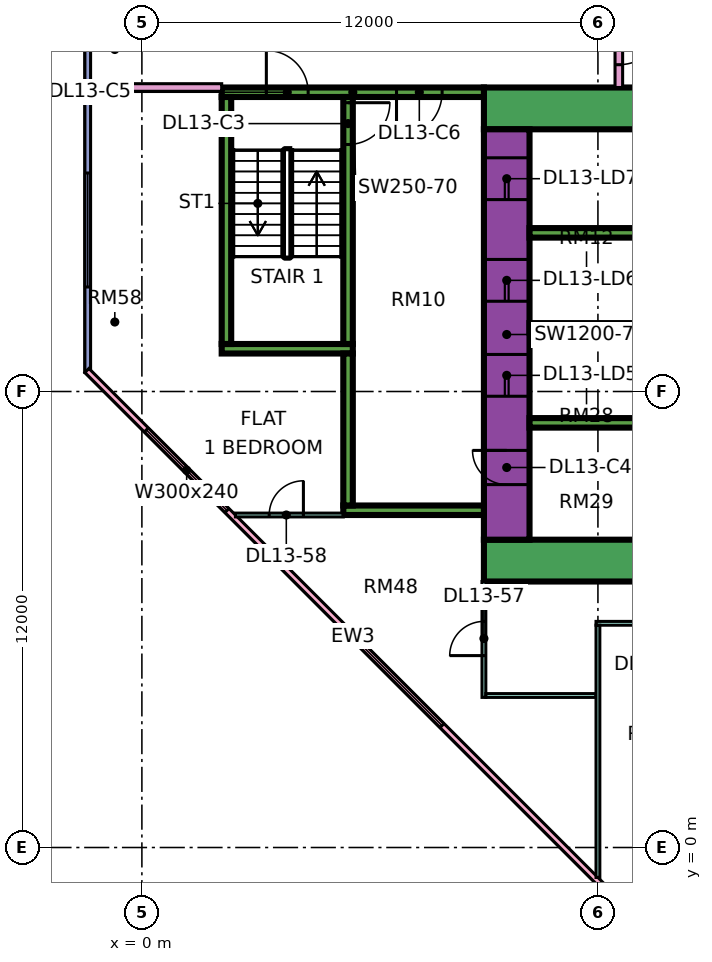
"""IFC4 building model, lengths in metres.
Left out: names, types, materials, properties, quantities, classifications, styles, units other than length and angle.
Written with IfcOpenShell. Run it as: python <this file> out.ifc"""

import sys

from ifc_helpers import new_model, si_unit, direction, frame, frame_2d, origin, place, context, subcontext, project, spatial, rectangle, extrude, element, fill, save


model = new_model("IFC4")
c1 = context("Model", 3, precision=1e-05, world=origin(), true_north=direction((0.0, 1.0)))
c2 = subcontext(c1, "Body", "Model", "MODEL_VIEW")
j1 = project(units=[si_unit("LENGTHUNIT", "METRE"), si_unit("PLANEANGLEUNIT", "RADIAN")], contexts=[c1])
p1 = place(None, origin())
s1 = spatial("IfcSite", under=j1, at=p1, CompositionType="ELEMENT")
p2 = place(p1, origin())
s2 = spatial("IfcBuilding", under=s1, at=p2, CompositionType="ELEMENT")
p3 = place(p2, frame((0.0, 0.0, 63.9)))
s3 = spatial("IfcBuildingStorey", under=s2, at=p3, CompositionType="ELEMENT", Elevation=63.9)
p4 = place(p3, frame((9.0, 7.55, 0.0), z_axis=(0.0, 0.0, 1.0), x_axis=(1.0, 0.0, 0.0)))
e1 = element("IfcWall", 1, at=p4, inside=s3, PredefinedType="SHEAR", context=c2, shape_type="SweptSolid", body=[
    extrude(rectangle(XDim=25.0, YDim=1.1, at=frame_2d((12.5, 0.0))), origin(), (0.0, 0.0, 1.0), 3.75),
])
p5 = place(p3, frame((9.0, 19.45, 0.0), z_axis=(0.0, 0.0, 1.0), x_axis=(1.0, 0.0, 0.0)))
e2 = element("IfcWall", 2, at=p5, inside=s3, PredefinedType="SHEAR", context=c2, shape_type="SweptSolid", body=[
    extrude(rectangle(XDim=25.0, YDim=1.1, at=frame_2d((12.5, 0.0))), origin(), (0.0, 0.0, 1.0), 3.75),
])
p6 = place(p5, frame((19.1, 0.0, 0.0)))
e3 = element("IfcOpeningElement", 3, at=p6, cuts=e2, PredefinedType="OPENING", context=c2, shape_type="SweptSolid", body=[
    extrude(rectangle(XDim=1.8, YDim=2.4, at=frame_2d((0.9, 1.2))), frame((0.0, 0.56, 0.0), z_axis=(0.0, -1.0, 0.0), x_axis=(1.0, 0.0, 0.0)), (0.0, 0.0, 1.0), 1.12),
])
p7 = place(p3, frame((9.6, 8.1, 0.0), z_axis=(0.0, 0.0, 1.0), x_axis=(0.0, 1.0, 0.0)))
e4 = element("IfcWall", 4, at=p7, inside=s3, PredefinedType="SHEAR", context=c2, shape_type="SweptSolid", body=[
    extrude(rectangle(XDim=10.8, YDim=1.2, at=frame_2d((5.4, 0.0))), origin(), (0.0, 0.0, 1.0), 3.75),
])
p8 = place(p7, frame((3.775, 0.0, 0.0)))
e5 = element("IfcOpeningElement", 5, at=p8, cuts=e4, PredefinedType="OPENING", context=c2, shape_type="SweptSolid", body=[
    extrude(rectangle(XDim=1.1, YDim=2.2, at=frame_2d((0.55, 1.1))), frame((0.0, 0.61, 0.0), z_axis=(0.0, -1.0, 0.0), x_axis=(1.0, 0.0, 0.0)), (0.0, 0.0, 1.0), 1.22),
])
p9 = place(p7, frame((6.275, 0.0, 0.0)))
e6 = element("IfcOpeningElement", 6, at=p9, cuts=e4, PredefinedType="OPENING", context=c2, shape_type="SweptSolid", body=[
    extrude(rectangle(XDim=1.1, YDim=2.2, at=frame_2d((0.55, 1.1))), frame((0.0, 0.61, 0.0), z_axis=(0.0, -1.0, 0.0), x_axis=(1.0, 0.0, 0.0)), (0.0, 0.0, 1.0), 1.22),
])
p10 = place(p7, frame((8.95, 0.0, 0.0)))
e7 = element("IfcOpeningElement", 7, at=p10, cuts=e4, PredefinedType="OPENING", context=c2, shape_type="SweptSolid", body=[
    extrude(rectangle(XDim=1.1, YDim=2.2, at=frame_2d((0.55, 1.1))), frame((0.0, 0.61, 0.0), z_axis=(0.0, -1.0, 0.0), x_axis=(1.0, 0.0, 0.0)), (0.0, 0.0, 1.0), 1.22),
])
p11 = place(p7, frame((1.45, 0.0, 0.0)))
e8 = element("IfcOpeningElement", 8, at=p11, cuts=e4, PredefinedType="OPENING", context=c2, shape_type="SweptSolid", body=[
    extrude(rectangle(XDim=0.9, YDim=2.1, at=frame_2d((0.45, 1.05))), frame((0.0, 0.61, 0.0), z_axis=(0.0, -1.0, 0.0), x_axis=(1.0, 0.0, 0.0)), (0.0, 0.0, 1.0), 1.22),
])
for number, where, z_axis, x_axis in (
    (9, (10.2, 11.175, 0.0), (0.0, 0.0, 1.0), (1.0, 0.0, 0.0)),
    (10, (10.2, 13.675, 0.0), (0.0, 0.0, 1.0), (1.0, 0.0, 0.0)),
    (11, (10.2, 16.175, 0.0), (0.0, 0.0, 1.0), (1.0, 0.0, 0.0)),
):
    element("IfcWall", number, at=place(p3, frame(where, z_axis=z_axis, x_axis=x_axis)), inside=s3, PredefinedType="SHEAR", context=c2, shape_type="SweptSolid", body=[
        extrude(rectangle(XDim=3.0, YDim=0.25, at=frame_2d((1.5, 0.0))), origin(), (0.0, 0.0, 1.0), 3.75),
    ])
p12 = place(p3, frame((2.1, 19.875, 0.0), z_axis=(0.0, 0.0, 1.0), x_axis=(1.0, 0.0, 0.0)))
e12 = element("IfcWall", 12, at=p12, inside=s3, PredefinedType="SHEAR", context=c2, shape_type="SweptSolid", body=[
    extrude(rectangle(XDim=6.9, YDim=0.25, at=frame_2d((3.45, 0.0))), origin(), (0.0, 0.0, 1.0), 3.75),
])
p13 = place(p12, frame((1.175, 0.0, 0.0)))
e13 = element("IfcOpeningElement", 13, at=p13, cuts=e12, PredefinedType="OPENING", context=c2, shape_type="SweptSolid", body=[
    extrude(rectangle(XDim=1.1, YDim=2.2, at=frame_2d((0.55, 1.1))), frame((0.0, 0.135, 0.0), z_axis=(0.0, -1.0, 0.0), x_axis=(1.0, 0.0, 0.0)), (0.0, 0.0, 1.0), 0.27),
])
p14 = place(p12, frame((4.6, 0.0, 0.0)))
e14 = element("IfcOpeningElement", 14, at=p14, cuts=e12, PredefinedType="OPENING", context=c2, shape_type="SweptSolid", body=[
    extrude(rectangle(XDim=1.2, YDim=2.2, at=frame_2d((0.6, 1.1))), frame((0.0, 0.135, 0.0), z_axis=(0.0, -1.0, 0.0), x_axis=(1.0, 0.0, 0.0)), (0.0, 0.0, 1.0), 0.27),
])
p15 = place(p3, frame((2.1, 13.125, 0.0), z_axis=(0.0, 0.0, 1.0), x_axis=(1.0, 0.0, 0.0)))
e15 = element("IfcWall", 15, at=p15, inside=s3, PredefinedType="SHEAR", context=c2, shape_type="SweptSolid", body=[
    extrude(rectangle(XDim=3.45, YDim=0.25, at=frame_2d((1.725, 0.0))), origin(), (0.0, 0.0, 1.0), 3.75),
])
p16 = place(p3, frame((2.225, 13.25, 0.0), z_axis=(0.0, 0.0, 1.0), x_axis=(0.0, 1.0, 0.0)))
e16 = element("IfcWall", 16, at=p16, inside=s3, PredefinedType="SHEAR", context=c2, shape_type="SweptSolid", body=[
    extrude(rectangle(XDim=6.5, YDim=0.25, at=frame_2d((3.25, 0.0))), origin(), (0.0, 0.0, 1.0), 3.75),
])
p17 = place(p3, frame((5.425, 13.25, 0.0), z_axis=(0.0, 0.0, 1.0), x_axis=(0.0, 1.0, 0.0)))
e17 = element("IfcWall", 17, at=p17, inside=s3, PredefinedType="SHEAR", context=c2, shape_type="SweptSolid", body=[
    extrude(rectangle(XDim=6.5, YDim=0.25, at=frame_2d((3.25, 0.0))), origin(), (0.0, 0.0, 1.0), 3.75),
])
p18 = place(p17, frame((5.25, 0.0, 0.0)))
e18 = element("IfcOpeningElement", 18, at=p18, cuts=e17, PredefinedType="OPENING", context=c2, shape_type="SweptSolid", body=[
    extrude(rectangle(XDim=1.1, YDim=2.2, at=frame_2d((0.55, 1.1))), frame((0.0, 0.135, 0.0), z_axis=(0.0, -1.0, 0.0), x_axis=(1.0, 0.0, 0.0)), (0.0, 0.0, 1.0), 0.27),
])
p19 = place(p3, frame((5.3, 8.875, 0.0), z_axis=(0.0, 0.0, 1.0), x_axis=(1.0, 0.0, 0.0)))
e19 = element("IfcWall", 19, at=p19, inside=s3, PredefinedType="SHEAR", context=c2, shape_type="SweptSolid", body=[
    extrude(rectangle(XDim=3.7, YDim=0.25, at=frame_2d((1.85, 0.0))), origin(), (0.0, 0.0, 1.0), 3.75),
])
p20 = place(p3, frame((5.425, 9.0, 0.0), z_axis=(0.0, 0.0, 1.0), x_axis=(0.0, 1.0, 0.0)))
e20 = element("IfcWall", 20, at=p20, inside=s3, PredefinedType="SHEAR", context=c2, shape_type="SweptSolid", body=[
    extrude(rectangle(XDim=4.0, YDim=0.25, at=frame_2d((2.0, 0.0))), origin(), (0.0, 0.0, 1.0), 3.75),
])
p21 = place(p3, frame((-1.425, 23.925, 0.0), z_axis=(0.0, 0.0, 1.0), x_axis=(0.0, -1.0, 0.0)))
e21 = element("IfcWall", 21, at=p21, inside=s3, PredefinedType="SOLIDWALL", context=c2, shape_type="SweptSolid", body=[
    extrude(rectangle(XDim=11.425, YDim=0.15, at=frame_2d((5.712, 0.0))), origin(), (0.0, 0.0, 1.0), 3.35),
])
p22 = place(p21, frame((6.175, 0.0, 0.45)))
e22 = element("IfcOpeningElement", 22, at=p22, cuts=e21, PredefinedType="OPENING", context=c2, shape_type="SweptSolid", body=[
    extrude(rectangle(XDim=3.0, YDim=2.4, at=frame_2d((1.5, 1.2))), frame((0.0, 0.085, 0.0), z_axis=(0.0, -1.0, 0.0), x_axis=(1.0, 0.0, 0.0)), (0.0, 0.0, 1.0), 0.17),
])
p23 = place(p3, frame((-1.447, 12.553, 0.0), z_axis=(0.0, 0.0, 1.0), x_axis=(0.707106781187, -0.707106781187, 0.0)))
e23 = element("IfcWall", 23, at=p23, inside=s3, PredefinedType="SOLIDWALL", context=c2, shape_type="SweptSolid", body=[
    extrude(rectangle(XDim=19.799, YDim=0.15, at=frame_2d((9.899, 0.0))), origin(), (0.0, 0.0, 1.0), 3.35),
])
p24 = place(p23, frame((2.212, 0.0, 0.45)))
e24 = element("IfcOpeningElement", 24, at=p24, cuts=e23, PredefinedType="OPENING", context=c2, shape_type="SweptSolid", body=[
    extrude(rectangle(XDim=3.0, YDim=2.4, at=frame_2d((1.5, 1.2))), frame((0.0, 0.085, 0.0), z_axis=(0.0, -1.0, 0.0), x_axis=(1.0, 0.0, 0.0)), (0.0, 0.0, 1.0), 0.17),
])
p25 = place(p23, frame((10.216, 0.0, 0.45)))
e25 = element("IfcOpeningElement", 25, at=p25, cuts=e23, PredefinedType="OPENING", context=c2, shape_type="SweptSolid", body=[
    extrude(rectangle(XDim=3.0, YDim=2.4, at=frame_2d((1.5, 1.2))), frame((0.0, 0.085, 0.0), z_axis=(0.0, -1.0, 0.0), x_axis=(1.0, 0.0, 0.0)), (0.0, 0.0, 1.0), 0.17),
])
p26 = place(p3, frame((-1.35, 20.0, 0.0), z_axis=(0.0, 0.0, 1.0), x_axis=(1.0, 0.0, 0.0)))
e26 = element("IfcWall", 26, at=p26, inside=s3, PredefinedType="PARTITIONING", context=c2, shape_type="SweptSolid", body=[
    extrude(rectangle(XDim=3.45, YDim=0.2, at=frame_2d((1.725, 0.0))), origin(), (0.0, 0.0, 1.0), 3.35),
])
p27 = place(p3, frame((2.461, 8.75, 0.0), z_axis=(0.0, 0.0, 1.0), x_axis=(1.0, 0.0, 0.0)))
e27 = element("IfcWall", 27, at=p27, inside=s3, PredefinedType="PARTITIONING", context=c2, shape_type="SweptSolid", body=[
    extrude(rectangle(XDim=2.839, YDim=0.1, at=frame_2d((1.419, 0.0))), origin(), (0.0, 0.0, 1.0), 3.35),
])
p28 = place(p27, frame((0.889, 0.0, 0.0)))
e28 = element("IfcOpeningElement", 28, at=p28, cuts=e27, PredefinedType="OPENING", context=c2, shape_type="SweptSolid", body=[
    extrude(rectangle(XDim=0.9, YDim=2.1, at=frame_2d((0.45, 1.05))), frame((0.0, 0.06, 0.0), z_axis=(0.0, -1.0, 0.0), x_axis=(1.0, 0.0, 0.0)), (0.0, 0.0, 1.0), 0.12),
])
p29 = place(p3, frame((9.0, 3.95, 0.0), z_axis=(0.0, 0.0, 1.0), x_axis=(0.0, 1.0, 0.0)))
e29 = element("IfcWall", 29, at=p29, inside=s3, PredefinedType="PARTITIONING", context=c2, shape_type="SweptSolid", body=[
    extrude(rectangle(XDim=3.05, YDim=0.1, at=frame_2d((1.525, 0.0))), origin(), (0.0, 0.0, 1.0), 3.35),
])
p30 = place(p29, frame((1.1, 0.0, 0.0)))
e30 = element("IfcOpeningElement", 30, at=p30, cuts=e29, PredefinedType="OPENING", context=c2, shape_type="SweptSolid", body=[
    extrude(rectangle(XDim=0.9, YDim=2.1, at=frame_2d((0.45, 1.05))), frame((0.0, 0.06, 0.0), z_axis=(0.0, -1.0, 0.0), x_axis=(1.0, 0.0, 0.0)), (0.0, 0.0, 1.0), 0.12),
])
p31 = place(p3, frame((9.05, 4.0, 0.0), z_axis=(0.0, 0.0, 1.0), x_axis=(1.0, 0.0, 0.0)))
e31 = element("IfcWall", 31, at=p31, inside=s3, PredefinedType="PARTITIONING", context=c2, shape_type="SweptSolid", body=[
    extrude(rectangle(XDim=2.9, YDim=0.1, at=frame_2d((1.45, 0.0))), origin(), (0.0, 0.0, 1.0), 3.35),
])
p32 = place(p3, frame((11.95, 5.9, 0.0), z_axis=(0.0, 0.0, 1.0), x_axis=(1.0, 0.0, 0.0)))
e32 = element("IfcWall", 32, at=p32, inside=s3, PredefinedType="PARTITIONING", context=c2, shape_type="SweptSolid", body=[
    extrude(rectangle(XDim=21.1, YDim=0.1, at=frame_2d((10.55, 0.0))), origin(), (0.0, 0.0, 1.0), 3.35),
])
p33 = place(p32, frame((1.1, 0.0, 0.0)))
e33 = element("IfcOpeningElement", 33, at=p33, cuts=e32, PredefinedType="OPENING", context=c2, shape_type="SweptSolid", body=[
    extrude(rectangle(XDim=0.9, YDim=2.1, at=frame_2d((0.45, 1.05))), frame((0.0, 0.06, 0.0), z_axis=(0.0, -1.0, 0.0), x_axis=(1.0, 0.0, 0.0)), (0.0, 0.0, 1.0), 0.12),
])
p34 = place(p32, frame((4.1, 0.0, 0.0)))
e34 = element("IfcOpeningElement", 34, at=p34, cuts=e32, PredefinedType="OPENING", context=c2, shape_type="SweptSolid", body=[
    extrude(rectangle(XDim=0.9, YDim=2.1, at=frame_2d((0.45, 1.05))), frame((0.0, 0.06, 0.0), z_axis=(0.0, -1.0, 0.0), x_axis=(1.0, 0.0, 0.0)), (0.0, 0.0, 1.0), 0.12),
])
p35 = place(p32, frame((7.1, 0.0, 0.0)))
e35 = element("IfcOpeningElement", 35, at=p35, cuts=e32, PredefinedType="OPENING", context=c2, shape_type="SweptSolid", body=[
    extrude(rectangle(XDim=0.9, YDim=2.1, at=frame_2d((0.45, 1.05))), frame((0.0, 0.06, 0.0), z_axis=(0.0, -1.0, 0.0), x_axis=(1.0, 0.0, 0.0)), (0.0, 0.0, 1.0), 0.12),
])
p36 = place(p32, frame((10.1, 0.0, 0.0)))
e36 = element("IfcOpeningElement", 36, at=p36, cuts=e32, PredefinedType="OPENING", context=c2, shape_type="SweptSolid", body=[
    extrude(rectangle(XDim=0.9, YDim=2.1, at=frame_2d((0.45, 1.05))), frame((0.0, 0.06, 0.0), z_axis=(0.0, -1.0, 0.0), x_axis=(1.0, 0.0, 0.0)), (0.0, 0.0, 1.0), 0.12),
])
p37 = place(p32, frame((16.1, 0.0, 0.0)))
e37 = element("IfcOpeningElement", 37, at=p37, cuts=e32, PredefinedType="OPENING", context=c2, shape_type="SweptSolid", body=[
    extrude(rectangle(XDim=0.9, YDim=2.1, at=frame_2d((0.45, 1.05))), frame((0.0, 0.06, 0.0), z_axis=(0.0, -1.0, 0.0), x_axis=(1.0, 0.0, 0.0)), (0.0, 0.0, 1.0), 0.12),
])
p38 = place(p3, frame((12.0, -0.788, 0.0), z_axis=(0.0, 0.0, 1.0), x_axis=(0.0, 1.0, 0.0)))
e38 = element("IfcWall", 38, at=p38, inside=s3, PredefinedType="PARTITIONING", context=c2, shape_type="SweptSolid", body=[
    extrude(rectangle(XDim=6.638, YDim=0.1, at=frame_2d((3.319, 0.0))), origin(), (0.0, 0.0, 1.0), 3.35),
])
p39 = place(p3, frame((12.55, 20.0, 0.0), z_axis=(0.0, 0.0, 1.0), x_axis=(0.0, 1.0, 0.0)))
e39 = element("IfcWall", 39, at=p39, inside=s3, PredefinedType="PARTITIONING", context=c2, shape_type="SweptSolid", body=[
    extrude(rectangle(XDim=43.0, YDim=0.2, at=frame_2d((21.5, 0.0))), origin(), (0.0, 0.0, 1.0), 3.35),
])
p40 = place(p39, frame((25.8, 0.0, 0.0)))
e40 = element("IfcOpeningElement", 40, at=p40, cuts=e39, PredefinedType="OPENING", context=c2, shape_type="SweptSolid", body=[
    extrude(rectangle(XDim=1.0, YDim=2.1, at=frame_2d((0.5, 1.05))), frame((0.0, 0.11, 0.0), z_axis=(0.0, -1.0, 0.0), x_axis=(1.0, 0.0, 0.0)), (0.0, 0.0, 1.0), 0.22),
])
p41 = place(p39, frame((0.6, 0.0, 0.0)))
e41 = element("IfcOpeningElement", 41, at=p41, cuts=e39, PredefinedType="OPENING", context=c2, shape_type="SweptSolid", body=[
    extrude(rectangle(XDim=1.2, YDim=2.1, at=frame_2d((0.6, 1.05))), frame((0.0, 0.11, 0.0), z_axis=(0.0, -1.0, 0.0), x_axis=(1.0, 0.0, 0.0)), (0.0, 0.0, 1.0), 0.22),
])
p42 = place(p39, frame((14.25, 0.0, 0.0)))
e42 = element("IfcOpeningElement", 42, at=p42, cuts=e39, PredefinedType="OPENING", context=c2, shape_type="SweptSolid", body=[
    extrude(rectangle(XDim=1.0, YDim=2.1, at=frame_2d((0.5, 1.05))), frame((0.0, 0.11, 0.0), z_axis=(0.0, -1.0, 0.0), x_axis=(1.0, 0.0, 0.0)), (0.0, 0.0, 1.0), 0.22),
])
p43 = place(p22, origin())
e43 = element("IfcWindow", 43, at=p43, inside=s3, PartitioningType="SINGLE_PANEL", PredefinedType="WINDOW", context=c2, shape_type="SweptSolid", body=[
    extrude(rectangle(XDim=3.0, YDim=2.4, at=frame_2d((1.5, 1.2))), frame((0.0, 0.03, 0.0), z_axis=(0.0, -1.0, 0.0), x_axis=(1.0, 0.0, 0.0)), (0.0, 0.0, 1.0), 0.06),
])
fill(e22, e43)
p44 = place(p24, origin())
e44 = element("IfcWindow", 44, at=p44, inside=s3, PartitioningType="SINGLE_PANEL", PredefinedType="WINDOW", context=c2, shape_type="SweptSolid", body=[
    extrude(rectangle(XDim=3.0, YDim=2.4, at=frame_2d((1.5, 1.2))), frame((0.0, 0.03, 0.0), z_axis=(0.0, -1.0, 0.0), x_axis=(1.0, 0.0, 0.0)), (0.0, 0.0, 1.0), 0.06),
])
fill(e24, e44)
p45 = place(p25, origin())
e45 = element("IfcWindow", 45, at=p45, inside=s3, PartitioningType="SINGLE_PANEL", PredefinedType="WINDOW", context=c2, shape_type="SweptSolid", body=[
    extrude(rectangle(XDim=3.0, YDim=2.4, at=frame_2d((1.5, 1.2))), frame((0.0, 0.03, 0.0), z_axis=(0.0, -1.0, 0.0), x_axis=(1.0, 0.0, 0.0)), (0.0, 0.0, 1.0), 0.06),
])
fill(e25, e45)
p46 = place(p8, origin())
e46 = element("IfcDoor", 46, at=p46, inside=s3, OperationType="DOUBLE_DOOR_SLIDING", PredefinedType="DOOR", context=c2, shape_type="SweptSolid", body=[
    extrude(rectangle(XDim=1.1, YDim=2.2, at=frame_2d((0.55, 1.1))), frame((0.0, 0.025, 0.0), z_axis=(0.0, -1.0, 0.0), x_axis=(1.0, 0.0, 0.0)), (0.0, 0.0, 1.0), 0.05),
])
fill(e5, e46)
p47 = place(p9, origin())
e47 = element("IfcDoor", 47, at=p47, inside=s3, OperationType="DOUBLE_DOOR_SLIDING", PredefinedType="DOOR", context=c2, shape_type="SweptSolid", body=[
    extrude(rectangle(XDim=1.1, YDim=2.2, at=frame_2d((0.55, 1.1))), frame((0.0, 0.025, 0.0), z_axis=(0.0, -1.0, 0.0), x_axis=(1.0, 0.0, 0.0)), (0.0, 0.0, 1.0), 0.05),
])
fill(e6, e47)
p48 = place(p10, origin())
e48 = element("IfcDoor", 48, at=p48, inside=s3, OperationType="DOUBLE_DOOR_SLIDING", PredefinedType="DOOR", context=c2, shape_type="SweptSolid", body=[
    extrude(rectangle(XDim=1.1, YDim=2.2, at=frame_2d((0.55, 1.1))), frame((0.0, 0.025, 0.0), z_axis=(0.0, -1.0, 0.0), x_axis=(1.0, 0.0, 0.0)), (0.0, 0.0, 1.0), 0.05),
])
fill(e7, e48)
p49 = place(p18, origin())
e49 = element("IfcDoor", 49, at=p49, inside=s3, OperationType="SINGLE_SWING_RIGHT", PredefinedType="DOOR", context=c2, shape_type="SweptSolid", body=[
    extrude(rectangle(XDim=1.1, YDim=2.2, at=frame_2d((0.55, 1.1))), frame((0.0, 0.025, 0.0), z_axis=(0.0, -1.0, 0.0), x_axis=(1.0, 0.0, 0.0)), (0.0, 0.0, 1.0), 0.05),
])
fill(e18, e49)
p50 = place(p11, frame((0.9, 0.0, 0.0), z_axis=(0.0, 0.0, 1.0), x_axis=(-1.0, 0.0, 0.0)))
e50 = element("IfcDoor", 50, at=p50, inside=s3, OperationType="SINGLE_SWING_RIGHT", PredefinedType="DOOR", context=c2, shape_type="SweptSolid", body=[
    extrude(rectangle(XDim=0.9, YDim=2.1, at=frame_2d((0.45, 1.05))), frame((0.0, 0.025, 0.0), z_axis=(0.0, -1.0, 0.0), x_axis=(1.0, 0.0, 0.0)), (0.0, 0.0, 1.0), 0.05),
])
fill(e8, e50)
p51 = place(p13, origin())
e51 = element("IfcDoor", 51, at=p51, inside=s3, OperationType="SINGLE_SWING_LEFT", PredefinedType="DOOR", context=c2, shape_type="SweptSolid", body=[
    extrude(rectangle(XDim=1.1, YDim=2.2, at=frame_2d((0.55, 1.1))), frame((0.0, 0.025, 0.0), z_axis=(0.0, -1.0, 0.0), x_axis=(1.0, 0.0, 0.0)), (0.0, 0.0, 1.0), 0.05),
])
fill(e13, e51)
p52 = place(p14, frame((1.2, 0.0, 0.0), z_axis=(0.0, 0.0, 1.0), x_axis=(-1.0, 0.0, 0.0)))
e52 = element("IfcDoor", 52, at=p52, inside=s3, OperationType="SINGLE_SWING_LEFT", PredefinedType="DOOR", context=c2, shape_type="SweptSolid", body=[
    extrude(rectangle(XDim=1.2, YDim=2.2, at=frame_2d((0.6, 1.1))), frame((0.0, 0.025, 0.0), z_axis=(0.0, -1.0, 0.0), x_axis=(1.0, 0.0, 0.0)), (0.0, 0.0, 1.0), 0.05),
])
fill(e14, e52)
p53 = place(p41, origin())
e53 = element("IfcDoor", 53, at=p53, inside=s3, OperationType="SINGLE_SWING_RIGHT", PredefinedType="DOOR", context=c2, shape_type="SweptSolid", body=[
    extrude(rectangle(XDim=1.2, YDim=2.1, at=frame_2d((0.6, 1.05))), frame((0.0, 0.025, 0.0), z_axis=(0.0, -1.0, 0.0), x_axis=(1.0, 0.0, 0.0)), (0.0, 0.0, 1.0), 0.05),
])
fill(e41, e53)
p54 = place(p30, origin())
e54 = element("IfcDoor", 54, at=p54, inside=s3, OperationType="SINGLE_SWING_LEFT", PredefinedType="DOOR", context=c2, shape_type="SweptSolid", body=[
    extrude(rectangle(XDim=0.9, YDim=2.1, at=frame_2d((0.45, 1.05))), frame((0.0, 0.025, 0.0), z_axis=(0.0, -1.0, 0.0), x_axis=(1.0, 0.0, 0.0)), (0.0, 0.0, 1.0), 0.05),
])
fill(e30, e54)
p55 = place(p28, frame((0.9, 0.0, 0.0), z_axis=(0.0, 0.0, 1.0), x_axis=(-1.0, 0.0, 0.0)))
e55 = element("IfcDoor", 55, at=p55, inside=s3, OperationType="SINGLE_SWING_RIGHT", PredefinedType="DOOR", context=c2, shape_type="SweptSolid", body=[
    extrude(rectangle(XDim=0.9, YDim=2.1, at=frame_2d((0.45, 1.05))), frame((0.0, 0.025, 0.0), z_axis=(0.0, -1.0, 0.0), x_axis=(1.0, 0.0, 0.0)), (0.0, 0.0, 1.0), 0.05),
])
fill(e28, e55)
save(model, sys.argv[1])
